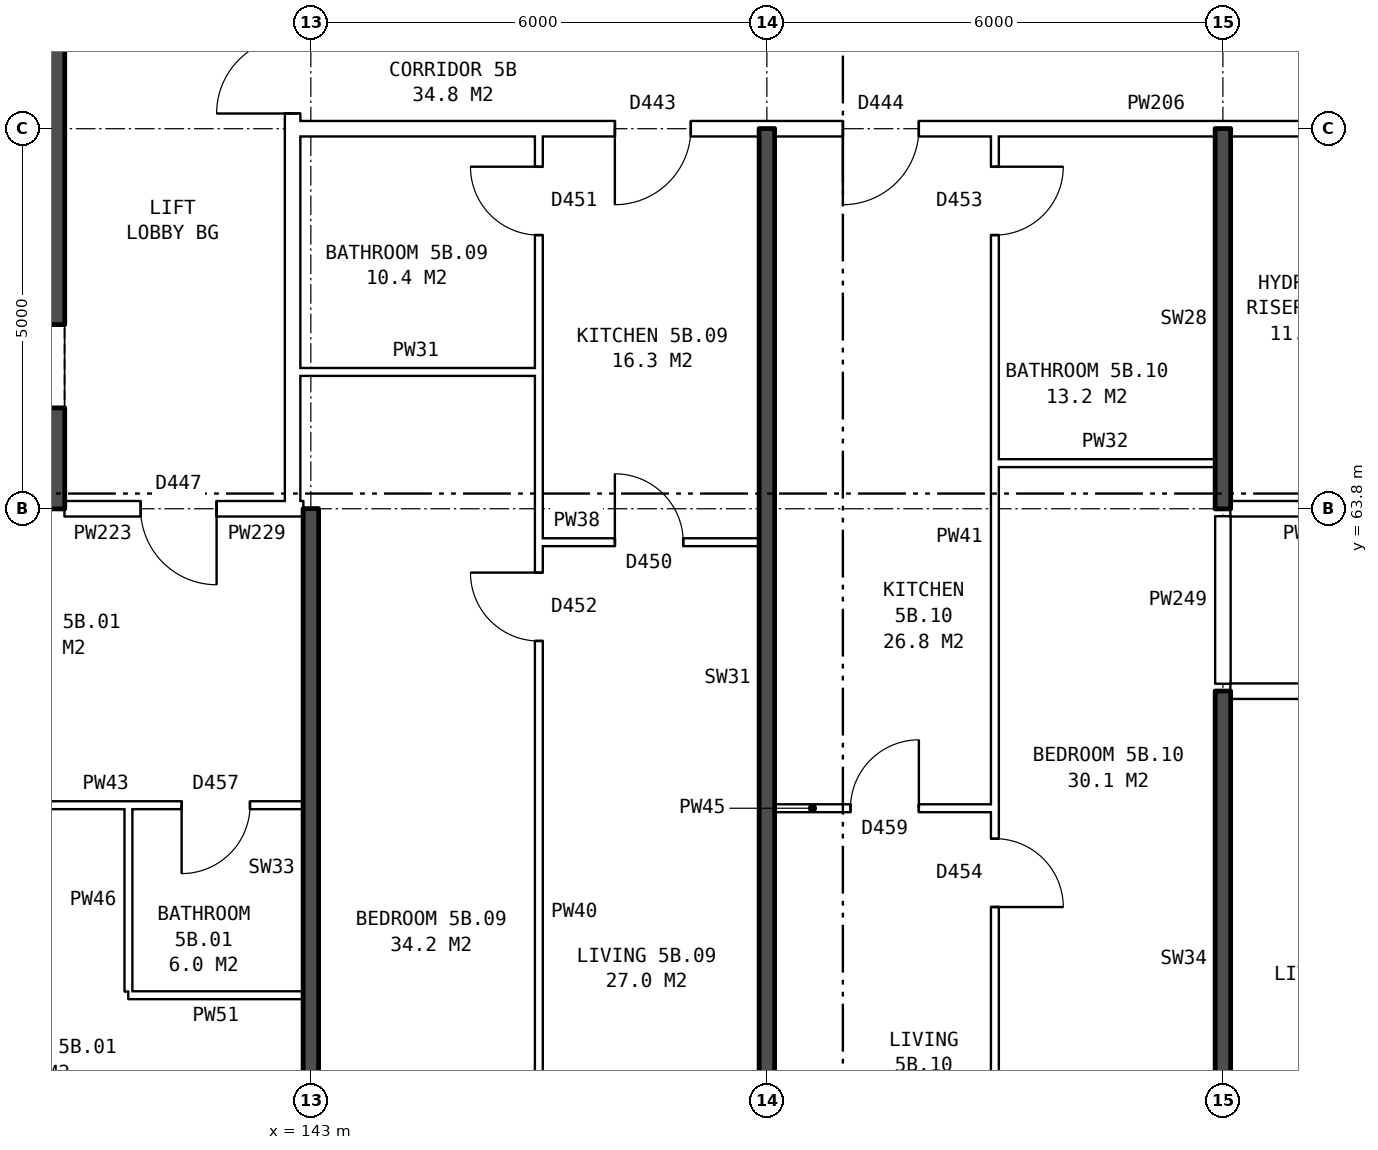
"""IFC4 building model, lengths in metres.
Left out: names, types, materials, properties, quantities, classifications, styles, units other than length and angle.
Written with IfcOpenShell. Run it as: python <this file> out.ifc"""

import sys

from ifc_helpers import new_model, si_unit, direction, frame, frame_2d, origin, place, context, subcontext, project, spatial, rectangle, extrude, element, fill, save


model = new_model("IFC4")
c1 = context("Model", 3, precision=1e-05, world=origin(), true_north=direction((0.0, 1.0)))
c2 = subcontext(c1, "Body", "Model", "MODEL_VIEW")
j1 = project(units=[si_unit("LENGTHUNIT", "METRE"), si_unit("PLANEANGLEUNIT", "RADIAN")], contexts=[c1])
p1 = place(None, origin())
s1 = spatial("IfcSite", under=j1, at=p1, CompositionType="ELEMENT")
p2 = place(p1, origin())
s2 = spatial("IfcBuilding", under=s1, at=p2, CompositionType="ELEMENT")
p3 = place(p2, frame((0.0, 0.0, 22.6)))
s3 = spatial("IfcBuildingStorey", under=s2, at=p3, CompositionType="ELEMENT", Elevation=22.6)
p4 = place(p3, frame((139.31, 64.7, 0.0), z_axis=(0.0, 0.0, 1.0), x_axis=(0.0, 1.0, 0.0)))
e1 = element("IfcWall", 1, at=p4, inside=s3, PredefinedType="SHEAR", context=c2, shape_type="SweptSolid", body=[
    extrude(rectangle(XDim=10.6, YDim=0.9, at=frame_2d((5.3, 0.0))), origin(), (0.0, 0.0, 1.0), 2.85),
])
p5 = place(p4, frame((0.425, 0.0, 0.0)))
e2 = element("IfcOpeningElement", 2, at=p5, cuts=e1, PredefinedType="OPENING", context=c2, shape_type="SweptSolid", body=[
    extrude(rectangle(XDim=1.1, YDim=2.1, at=frame_2d((0.55, 1.05))), frame((0.0, 0.46, 0.0), z_axis=(0.0, -1.0, 0.0), x_axis=(1.0, 0.0, 0.0)), (0.0, 0.0, 1.0), 0.92),
])
p6 = place(p4, frame((9.0, 0.0, 0.0)))
e3 = element("IfcOpeningElement", 3, at=p6, cuts=e1, PredefinedType="OPENING", context=c2, shape_type="SweptSolid", body=[
    extrude(rectangle(XDim=1.1, YDim=2.1, at=frame_2d((0.55, 1.05))), frame((0.0, 0.46, 0.0), z_axis=(0.0, -1.0, 0.0), x_axis=(1.0, 0.0, 0.0)), (0.0, 0.0, 1.0), 0.92),
])
p7 = place(p4, frame((7.225, 0.0, 0.0)))
e4 = element("IfcOpeningElement", 4, at=p7, cuts=e1, PredefinedType="OPENING", context=c2, shape_type="SweptSolid", body=[
    extrude(rectangle(XDim=0.85, YDim=2.1, at=frame_2d((0.425, 1.05))), frame((0.0, 0.46, 0.0), z_axis=(0.0, -1.0, 0.0), x_axis=(1.0, 0.0, 0.0)), (0.0, 0.0, 1.0), 0.92),
])
p8 = place(p3, frame((139.76, 64.25, 0.0), z_axis=(0.0, 0.0, 1.0), x_axis=(-1.0, 0.0, 0.0)))
e5 = element("IfcWall", 5, at=p8, inside=s3, PredefinedType="SHEAR", context=c2, shape_type="SweptSolid", body=[
    extrude(rectangle(XDim=8.4, YDim=0.9, at=frame_2d((4.2, 0.0))), origin(), (0.0, 0.0, 1.0), 2.85),
])
p9 = place(p3, frame((142.76, 63.9, 0.0), z_axis=(0.0, 0.0, 1.0), x_axis=(0.0, 1.0, 0.0)))
e6 = element("IfcWall", 6, at=p9, inside=s3, PredefinedType="PARTITIONING", context=c2, shape_type="SweptSolid", body=[
    extrude(rectangle(XDim=12.2, YDim=0.2, at=frame_2d((6.1, 0.0))), origin(), (0.0, 0.0, 1.0), 2.85),
])
p10 = place(p9, frame((5.1, 0.0, 0.0)))
e7 = element("IfcOpeningElement", 7, at=p10, cuts=e6, PredefinedType="OPENING", context=c2, shape_type="SweptSolid", body=[
    extrude(rectangle(XDim=2.0, YDim=2.1, at=frame_2d((1.0, 1.05))), frame((0.0, 0.11, 0.0), z_axis=(0.0, -1.0, 0.0), x_axis=(1.0, 0.0, 0.0)), (0.0, 0.0, 1.0), 0.22),
])
p11 = place(p3, frame((140.6, 57.4, 0.0), z_axis=(0.0, 0.0, 1.0), x_axis=(1.0, 0.0, 0.0)))
e8 = element("IfcWall", 8, at=p11, inside=s3, PredefinedType="PARTITIONING", context=c2, shape_type="SweptSolid", body=[
    extrude(rectangle(XDim=2.3, YDim=0.1, at=frame_2d((1.15, 0.0))), origin(), (0.0, 0.0, 1.0), 2.85),
])
p12 = place(p3, frame((149.1, 59.86, 0.0), z_axis=(0.0, 0.0, 1.0), x_axis=(1.0, 0.0, 0.0)))
e9 = element("IfcWall", 9, at=p12, inside=s3, PredefinedType="PARTITIONING", context=c2, shape_type="SweptSolid", body=[
    extrude(rectangle(XDim=2.9, YDim=0.1, at=frame_2d((1.45, 0.0))), origin(), (0.0, 0.0, 1.0), 2.85),
])
p13 = place(p12, frame((1.0, 0.0, 0.0)))
e10 = element("IfcOpeningElement", 10, at=p13, cuts=e9, PredefinedType="OPENING", context=c2, shape_type="SweptSolid", body=[
    extrude(rectangle(XDim=0.9, YDim=2.1, at=frame_2d((0.45, 1.05))), frame((0.0, 0.06, 0.0), z_axis=(0.0, -1.0, 0.0), x_axis=(1.0, 0.0, 0.0)), (0.0, 0.0, 1.0), 0.12),
])
p14 = place(p3, frame((137.1, 59.9, 0.0), z_axis=(0.0, 0.0, 1.0), x_axis=(1.0, 0.0, 0.0)))
e11 = element("IfcWall", 11, at=p14, inside=s3, PredefinedType="PARTITIONING", context=c2, shape_type="SweptSolid", body=[
    extrude(rectangle(XDim=5.8, YDim=0.1, at=frame_2d((2.9, 0.0))), origin(), (0.0, 0.0, 1.0), 2.85),
])
p15 = place(p14, frame((1.3, 0.0, 0.0)))
e12 = element("IfcOpeningElement", 12, at=p15, cuts=e11, PredefinedType="OPENING", context=c2, shape_type="SweptSolid", body=[
    extrude(rectangle(XDim=0.9, YDim=2.1, at=frame_2d((0.45, 1.05))), frame((0.0, 0.06, 0.0), z_axis=(0.0, -1.0, 0.0), x_axis=(1.0, 0.0, 0.0)), (0.0, 0.0, 1.0), 0.12),
])
p16 = place(p14, frame((4.2, 0.0, 0.0)))
e13 = element("IfcOpeningElement", 13, at=p16, cuts=e11, PredefinedType="OPENING", context=c2, shape_type="SweptSolid", body=[
    extrude(rectangle(XDim=0.9, YDim=2.1, at=frame_2d((0.45, 1.05))), frame((0.0, 0.06, 0.0), z_axis=(0.0, -1.0, 0.0), x_axis=(1.0, 0.0, 0.0)), (0.0, 0.0, 1.0), 0.12),
])
p17 = place(p3, frame((155.1, 61.4, 0.0), z_axis=(0.0, 0.0, 1.0), x_axis=(1.0, 0.0, 0.0)))
e14 = element("IfcWall", 14, at=p17, inside=s3, PredefinedType="PARTITIONING", context=c2, shape_type="SweptSolid", body=[
    extrude(rectangle(XDim=22.29, YDim=0.2, at=frame_2d((11.145, 0.0))), origin(), (0.0, 0.0, 1.0), 2.85),
])
p18 = place(p17, frame((2.45, 0.0, 0.0)))
e15 = element("IfcOpeningElement", 15, at=p18, cuts=e14, PredefinedType="OPENING", context=c2, shape_type="SweptSolid", body=[
    extrude(rectangle(XDim=1.0, YDim=2.1, at=frame_2d((0.5, 1.05))), frame((0.0, 0.11, 0.0), z_axis=(0.0, -1.0, 0.0), x_axis=(1.0, 0.0, 0.0)), (0.0, 0.0, 1.0), 0.22),
])
p19 = place(p17, frame((14.4, 0.0, 0.0)))
e16 = element("IfcOpeningElement", 16, at=p19, cuts=e14, PredefinedType="OPENING", context=c2, shape_type="SweptSolid", body=[
    extrude(rectangle(XDim=1.0, YDim=2.1, at=frame_2d((0.5, 1.05))), frame((0.0, 0.11, 0.0), z_axis=(0.0, -1.0, 0.0), x_axis=(1.0, 0.0, 0.0)), (0.0, 0.0, 1.0), 0.22),
])
p20 = place(p3, frame((146.0, 63.36, 0.0), z_axis=(0.0, 0.0, 1.0), x_axis=(1.0, 0.0, 0.0)))
e17 = element("IfcWall", 17, at=p20, inside=s3, PredefinedType="PARTITIONING", context=c2, shape_type="SweptSolid", body=[
    extrude(rectangle(XDim=2.9, YDim=0.1, at=frame_2d((1.45, 0.0))), origin(), (0.0, 0.0, 1.0), 2.85),
])
p21 = place(p20, frame((1.0, 0.0, 0.0)))
e18 = element("IfcOpeningElement", 18, at=p21, cuts=e17, PredefinedType="OPENING", context=c2, shape_type="SweptSolid", body=[
    extrude(rectangle(XDim=0.9, YDim=2.1, at=frame_2d((0.45, 1.05))), frame((0.0, 0.06, 0.0), z_axis=(0.0, -1.0, 0.0), x_axis=(1.0, 0.0, 0.0)), (0.0, 0.0, 1.0), 0.12),
])
p22 = place(p3, frame((139.76, 63.8, 0.0), z_axis=(0.0, 0.0, 1.0), x_axis=(1.0, 0.0, 0.0)))
e19 = element("IfcWall", 19, at=p22, inside=s3, PredefinedType="PARTITIONING", context=c2, shape_type="SweptSolid", body=[
    extrude(rectangle(XDim=3.0, YDim=0.2, at=frame_2d((1.5, 0.0))), origin(), (0.0, 0.0, 1.0), 2.85),
])
p23 = place(p22, frame((1.0, 0.0, 0.0)))
e20 = element("IfcOpeningElement", 20, at=p23, cuts=e19, PredefinedType="OPENING", context=c2, shape_type="SweptSolid", body=[
    extrude(rectangle(XDim=1.0, YDim=2.1, at=frame_2d((0.5, 1.05))), frame((0.0, 0.11, 0.0), z_axis=(0.0, -1.0, 0.0), x_axis=(1.0, 0.0, 0.0)), (0.0, 0.0, 1.0), 0.22),
])
p24 = place(p3, frame((142.76, 63.8, 0.0), z_axis=(0.0, 0.0, 1.0), x_axis=(1.0, 0.0, 0.0)))
e21 = element("IfcWall", 21, at=p24, inside=s3, PredefinedType="PARTITIONING", context=c2, shape_type="SweptSolid", body=[
    extrude(rectangle(XDim=0.14, YDim=0.2, at=frame_2d((0.07, 0.0))), origin(), (0.0, 0.0, 1.0), 2.85),
])
p25 = place(p3, frame((155.1, 63.8, 0.0), z_axis=(0.0, 0.0, 1.0), x_axis=(1.0, 0.0, 0.0)))
e22 = element("IfcWall", 22, at=p25, inside=s3, PredefinedType="PARTITIONING", context=c2, shape_type="SweptSolid", body=[
    extrude(rectangle(XDim=2.14, YDim=0.2, at=frame_2d((1.07, 0.0))), origin(), (0.0, 0.0, 1.0), 2.85),
])
p26 = place(p3, frame((152.0, 64.4, 0.0), z_axis=(0.0, 0.0, 1.0), x_axis=(1.0, 0.0, 0.0)))
e23 = element("IfcWall", 23, at=p26, inside=s3, PredefinedType="PARTITIONING", context=c2, shape_type="SweptSolid", body=[
    extrude(rectangle(XDim=2.9, YDim=0.1, at=frame_2d((1.45, 0.0))), origin(), (0.0, 0.0, 1.0), 2.85),
])
p27 = place(p3, frame((142.76, 65.6, 0.0), z_axis=(0.0, 0.0, 1.0), x_axis=(1.0, 0.0, 0.0)))
e24 = element("IfcWall", 24, at=p27, inside=s3, PredefinedType="PARTITIONING", context=c2, shape_type="SweptSolid", body=[
    extrude(rectangle(XDim=3.24, YDim=0.1, at=frame_2d((1.62, 0.0))), origin(), (0.0, 0.0, 1.0), 2.85),
])
p28 = place(p3, frame((142.76, 68.8, 0.0), z_axis=(0.0, 0.0, 1.0), x_axis=(1.0, 0.0, 0.0)))
e25 = element("IfcWall", 25, at=p28, inside=s3, PredefinedType="PARTITIONING", context=c2, shape_type="SweptSolid", body=[
    extrude(rectangle(XDim=14.48, YDim=0.2, at=frame_2d((7.24, 0.0))), origin(), (0.0, 0.0, 1.0), 2.85),
])
p29 = place(p28, frame((4.24, 0.0, 0.0)))
e26 = element("IfcOpeningElement", 26, at=p29, cuts=e25, PredefinedType="OPENING", context=c2, shape_type="SweptSolid", body=[
    extrude(rectangle(XDim=1.0, YDim=2.1, at=frame_2d((0.5, 1.05))), frame((0.0, 0.11, 0.0), z_axis=(0.0, -1.0, 0.0), x_axis=(1.0, 0.0, 0.0)), (0.0, 0.0, 1.0), 0.22),
])
p30 = place(p28, frame((7.24, 0.0, 0.0)))
e27 = element("IfcOpeningElement", 27, at=p30, cuts=e25, PredefinedType="OPENING", context=c2, shape_type="SweptSolid", body=[
    extrude(rectangle(XDim=1.0, YDim=2.1, at=frame_2d((0.5, 1.05))), frame((0.0, 0.11, 0.0), z_axis=(0.0, -1.0, 0.0), x_axis=(1.0, 0.0, 0.0)), (0.0, 0.0, 1.0), 0.22),
])
p31 = place(p3, frame((140.6, 57.45, 0.0), z_axis=(0.0, 0.0, 1.0), x_axis=(0.0, 1.0, 0.0)))
e28 = element("IfcWall", 28, at=p31, inside=s3, PredefinedType="PARTITIONING", context=c2, shape_type="SweptSolid", body=[
    extrude(rectangle(XDim=2.4, YDim=0.1, at=frame_2d((1.2, 0.0))), origin(), (0.0, 0.0, 1.0), 2.85),
])
p32 = place(p3, frame((143.0, 54.36, 0.0), z_axis=(0.0, 0.0, 1.0), x_axis=(0.0, 1.0, 0.0)))
e29 = element("IfcWall", 29, at=p32, inside=s3, PredefinedType="SOLIDWALL", context=c2, shape_type="SweptSolid", body=[
    extrude(rectangle(XDim=9.44, YDim=0.2, at=frame_2d((4.72, 0.0))), origin(), (0.0, 0.0, 1.0), 2.85),
])
p33 = place(p3, frame((146.0, 54.36, 0.0), z_axis=(0.0, 0.0, 1.0), x_axis=(0.0, 1.0, 0.0)))
e30 = element("IfcWall", 30, at=p33, inside=s3, PredefinedType="PARTITIONING", context=c2, shape_type="SweptSolid", body=[
    extrude(rectangle(XDim=14.34, YDim=0.1, at=frame_2d((7.17, 0.0))), origin(), (0.0, 0.0, 1.0), 2.85),
])
p34 = place(p33, frame((7.7, 0.0, 0.0)))
e31 = element("IfcOpeningElement", 31, at=p34, cuts=e30, PredefinedType="OPENING", context=c2, shape_type="SweptSolid", body=[
    extrude(rectangle(XDim=0.9, YDim=2.1, at=frame_2d((0.45, 1.05))), frame((0.0, 0.06, 0.0), z_axis=(0.0, -1.0, 0.0), x_axis=(1.0, 0.0, 0.0)), (0.0, 0.0, 1.0), 0.12),
])
p35 = place(p33, frame((13.04, 0.0, 0.0)))
e32 = element("IfcOpeningElement", 32, at=p35, cuts=e30, PredefinedType="OPENING", context=c2, shape_type="SweptSolid", body=[
    extrude(rectangle(XDim=0.9, YDim=2.1, at=frame_2d((0.45, 1.05))), frame((0.0, 0.06, 0.0), z_axis=(0.0, -1.0, 0.0), x_axis=(1.0, 0.0, 0.0)), (0.0, 0.0, 1.0), 0.12),
])
p36 = place(p3, frame((149.0, 54.36, 0.0), z_axis=(0.0, 0.0, 1.0), x_axis=(0.0, 1.0, 0.0)))
e33 = element("IfcWall", 33, at=p36, inside=s3, PredefinedType="SOLIDWALL", context=c2, shape_type="SweptSolid", body=[
    extrude(rectangle(XDim=14.44, YDim=0.2, at=frame_2d((7.22, 0.0))), origin(), (0.0, 0.0, 1.0), 2.85),
])
p37 = place(p3, frame((152.0, 54.36, 0.0), z_axis=(0.0, 0.0, 1.0), x_axis=(0.0, 1.0, 0.0)))
e34 = element("IfcWall", 34, at=p37, inside=s3, PredefinedType="PARTITIONING", context=c2, shape_type="SweptSolid", body=[
    extrude(rectangle(XDim=14.34, YDim=0.1, at=frame_2d((7.17, 0.0))), origin(), (0.0, 0.0, 1.0), 2.85),
])
p38 = place(p37, frame((4.2, 0.0, 0.0)))
e35 = element("IfcOpeningElement", 35, at=p38, cuts=e34, PredefinedType="OPENING", context=c2, shape_type="SweptSolid", body=[
    extrude(rectangle(XDim=0.9, YDim=2.1, at=frame_2d((0.45, 1.05))), frame((0.0, 0.06, 0.0), z_axis=(0.0, -1.0, 0.0), x_axis=(1.0, 0.0, 0.0)), (0.0, 0.0, 1.0), 0.12),
])
p39 = place(p37, frame((13.04, 0.0, 0.0)))
e36 = element("IfcOpeningElement", 36, at=p39, cuts=e34, PredefinedType="OPENING", context=c2, shape_type="SweptSolid", body=[
    extrude(rectangle(XDim=0.9, YDim=2.1, at=frame_2d((0.45, 1.05))), frame((0.0, 0.06, 0.0), z_axis=(0.0, -1.0, 0.0), x_axis=(1.0, 0.0, 0.0)), (0.0, 0.0, 1.0), 0.12),
])
p40 = place(p3, frame((155.0, 54.36, 0.0), z_axis=(0.0, 0.0, 1.0), x_axis=(0.0, 1.0, 0.0)))
e37 = element("IfcWall", 37, at=p40, inside=s3, PredefinedType="SOLIDWALL", context=c2, shape_type="SweptSolid", body=[
    extrude(rectangle(XDim=7.04, YDim=0.2, at=frame_2d((3.52, 0.0))), origin(), (0.0, 0.0, 1.0), 2.85),
])
p41 = place(p3, frame((155.0, 61.5, 0.0), z_axis=(0.0, 0.0, 1.0), x_axis=(0.0, 1.0, 0.0)))
e38 = element("IfcWall", 38, at=p41, inside=s3, PredefinedType="PARTITIONING", context=c2, shape_type="SweptSolid", body=[
    extrude(rectangle(XDim=2.2, YDim=0.2, at=frame_2d((1.1, 0.0))), origin(), (0.0, 0.0, 1.0), 2.85),
])
p42 = place(p3, frame((155.0, 63.8, 0.0), z_axis=(0.0, 0.0, 1.0), x_axis=(0.0, 1.0, 0.0)))
e39 = element("IfcWall", 39, at=p42, inside=s3, PredefinedType="SOLIDWALL", context=c2, shape_type="SweptSolid", body=[
    extrude(rectangle(XDim=5.0, YDim=0.2, at=frame_2d((2.5, 0.0))), origin(), (0.0, 0.0, 1.0), 2.85),
])
p43 = place(p10, origin())
e40 = element("IfcDoor", 40, at=p43, inside=s3, OperationType="DOUBLE_DOOR_SINGLE_SWING", PredefinedType="DOOR", context=c2, shape_type="SweptSolid", body=[
    extrude(rectangle(XDim=2.0, YDim=2.1, at=frame_2d((1.0, 1.05))), frame((0.0, 0.025, 0.0), z_axis=(0.0, -1.0, 0.0), x_axis=(1.0, 0.0, 0.0)), (0.0, 0.0, 1.0), 0.05),
])
fill(e7, e40)
p44 = place(p23, frame((1.0, 0.0, 0.0), z_axis=(0.0, 0.0, 1.0), x_axis=(-1.0, 0.0, 0.0)))
e41 = element("IfcDoor", 41, at=p44, inside=s3, OperationType="SINGLE_SWING_LEFT", PredefinedType="DOOR", context=c2, shape_type="SweptSolid", body=[
    extrude(rectangle(XDim=1.0, YDim=2.1, at=frame_2d((0.5, 1.05))), frame((0.0, 0.025, 0.0), z_axis=(0.0, -1.0, 0.0), x_axis=(1.0, 0.0, 0.0)), (0.0, 0.0, 1.0), 0.05),
])
fill(e20, e41)
p45 = place(p16, frame((0.9, 0.0, 0.0), z_axis=(0.0, 0.0, 1.0), x_axis=(-1.0, 0.0, 0.0)))
e42 = element("IfcDoor", 42, at=p45, inside=s3, OperationType="SINGLE_SWING_RIGHT", PredefinedType="DOOR", context=c2, shape_type="SweptSolid", body=[
    extrude(rectangle(XDim=0.9, YDim=2.1, at=frame_2d((0.45, 1.05))), frame((0.0, 0.025, 0.0), z_axis=(0.0, -1.0, 0.0), x_axis=(1.0, 0.0, 0.0)), (0.0, 0.0, 1.0), 0.05),
])
fill(e13, e42)
p46 = place(p34, origin())
e43 = element("IfcDoor", 43, at=p46, inside=s3, OperationType="SINGLE_SWING_RIGHT", PredefinedType="DOOR", context=c2, shape_type="SweptSolid", body=[
    extrude(rectangle(XDim=0.9, YDim=2.1, at=frame_2d((0.45, 1.05))), frame((0.0, 0.025, 0.0), z_axis=(0.0, -1.0, 0.0), x_axis=(1.0, 0.0, 0.0)), (0.0, 0.0, 1.0), 0.05),
])
fill(e31, e43)
p47 = place(p29, frame((1.0, 0.0, 0.0), z_axis=(0.0, 0.0, 1.0), x_axis=(-1.0, 0.0, 0.0)))
e44 = element("IfcDoor", 44, at=p47, inside=s3, OperationType="SINGLE_SWING_RIGHT", PredefinedType="DOOR", context=c2, shape_type="SweptSolid", body=[
    extrude(rectangle(XDim=1.0, YDim=2.1, at=frame_2d((0.5, 1.05))), frame((0.0, 0.025, 0.0), z_axis=(0.0, -1.0, 0.0), x_axis=(1.0, 0.0, 0.0)), (0.0, 0.0, 1.0), 0.05),
])
fill(e26, e44)
p48 = place(p21, origin())
e45 = element("IfcDoor", 45, at=p48, inside=s3, OperationType="SINGLE_SWING_LEFT", PredefinedType="DOOR", context=c2, shape_type="SweptSolid", body=[
    extrude(rectangle(XDim=0.9, YDim=2.1, at=frame_2d((0.45, 1.05))), frame((0.0, 0.025, 0.0), z_axis=(0.0, -1.0, 0.0), x_axis=(1.0, 0.0, 0.0)), (0.0, 0.0, 1.0), 0.05),
])
fill(e18, e45)
p49 = place(p35, origin())
e46 = element("IfcDoor", 46, at=p49, inside=s3, OperationType="SINGLE_SWING_RIGHT", PredefinedType="DOOR", context=c2, shape_type="SweptSolid", body=[
    extrude(rectangle(XDim=0.9, YDim=2.1, at=frame_2d((0.45, 1.05))), frame((0.0, 0.025, 0.0), z_axis=(0.0, -1.0, 0.0), x_axis=(1.0, 0.0, 0.0)), (0.0, 0.0, 1.0), 0.05),
])
fill(e32, e46)
p50 = place(p38, frame((0.9, 0.0, 0.0), z_axis=(0.0, 0.0, 1.0), x_axis=(-1.0, 0.0, 0.0)))
e47 = element("IfcDoor", 47, at=p50, inside=s3, OperationType="SINGLE_SWING_RIGHT", PredefinedType="DOOR", context=c2, shape_type="SweptSolid", body=[
    extrude(rectangle(XDim=0.9, YDim=2.1, at=frame_2d((0.45, 1.05))), frame((0.0, 0.025, 0.0), z_axis=(0.0, -1.0, 0.0), x_axis=(1.0, 0.0, 0.0)), (0.0, 0.0, 1.0), 0.05),
])
fill(e35, e47)
p51 = place(p30, frame((1.0, 0.0, 0.0), z_axis=(0.0, 0.0, 1.0), x_axis=(-1.0, 0.0, 0.0)))
e48 = element("IfcDoor", 48, at=p51, inside=s3, OperationType="SINGLE_SWING_RIGHT", PredefinedType="DOOR", context=c2, shape_type="SweptSolid", body=[
    extrude(rectangle(XDim=1.0, YDim=2.1, at=frame_2d((0.5, 1.05))), frame((0.0, 0.025, 0.0), z_axis=(0.0, -1.0, 0.0), x_axis=(1.0, 0.0, 0.0)), (0.0, 0.0, 1.0), 0.05),
])
fill(e27, e48)
p52 = place(p13, origin())
e49 = element("IfcDoor", 49, at=p52, inside=s3, OperationType="SINGLE_SWING_RIGHT", PredefinedType="DOOR", context=c2, shape_type="SweptSolid", body=[
    extrude(rectangle(XDim=0.9, YDim=2.1, at=frame_2d((0.45, 1.05))), frame((0.0, 0.025, 0.0), z_axis=(0.0, -1.0, 0.0), x_axis=(1.0, 0.0, 0.0)), (0.0, 0.0, 1.0), 0.05),
])
fill(e10, e49)
p53 = place(p39, frame((0.9, 0.0, 0.0), z_axis=(0.0, 0.0, 1.0), x_axis=(-1.0, 0.0, 0.0)))
e50 = element("IfcDoor", 50, at=p53, inside=s3, OperationType="SINGLE_SWING_LEFT", PredefinedType="DOOR", context=c2, shape_type="SweptSolid", body=[
    extrude(rectangle(XDim=0.9, YDim=2.1, at=frame_2d((0.45, 1.05))), frame((0.0, 0.025, 0.0), z_axis=(0.0, -1.0, 0.0), x_axis=(1.0, 0.0, 0.0)), (0.0, 0.0, 1.0), 0.05),
])
fill(e36, e50)
save(model, sys.argv[1])
